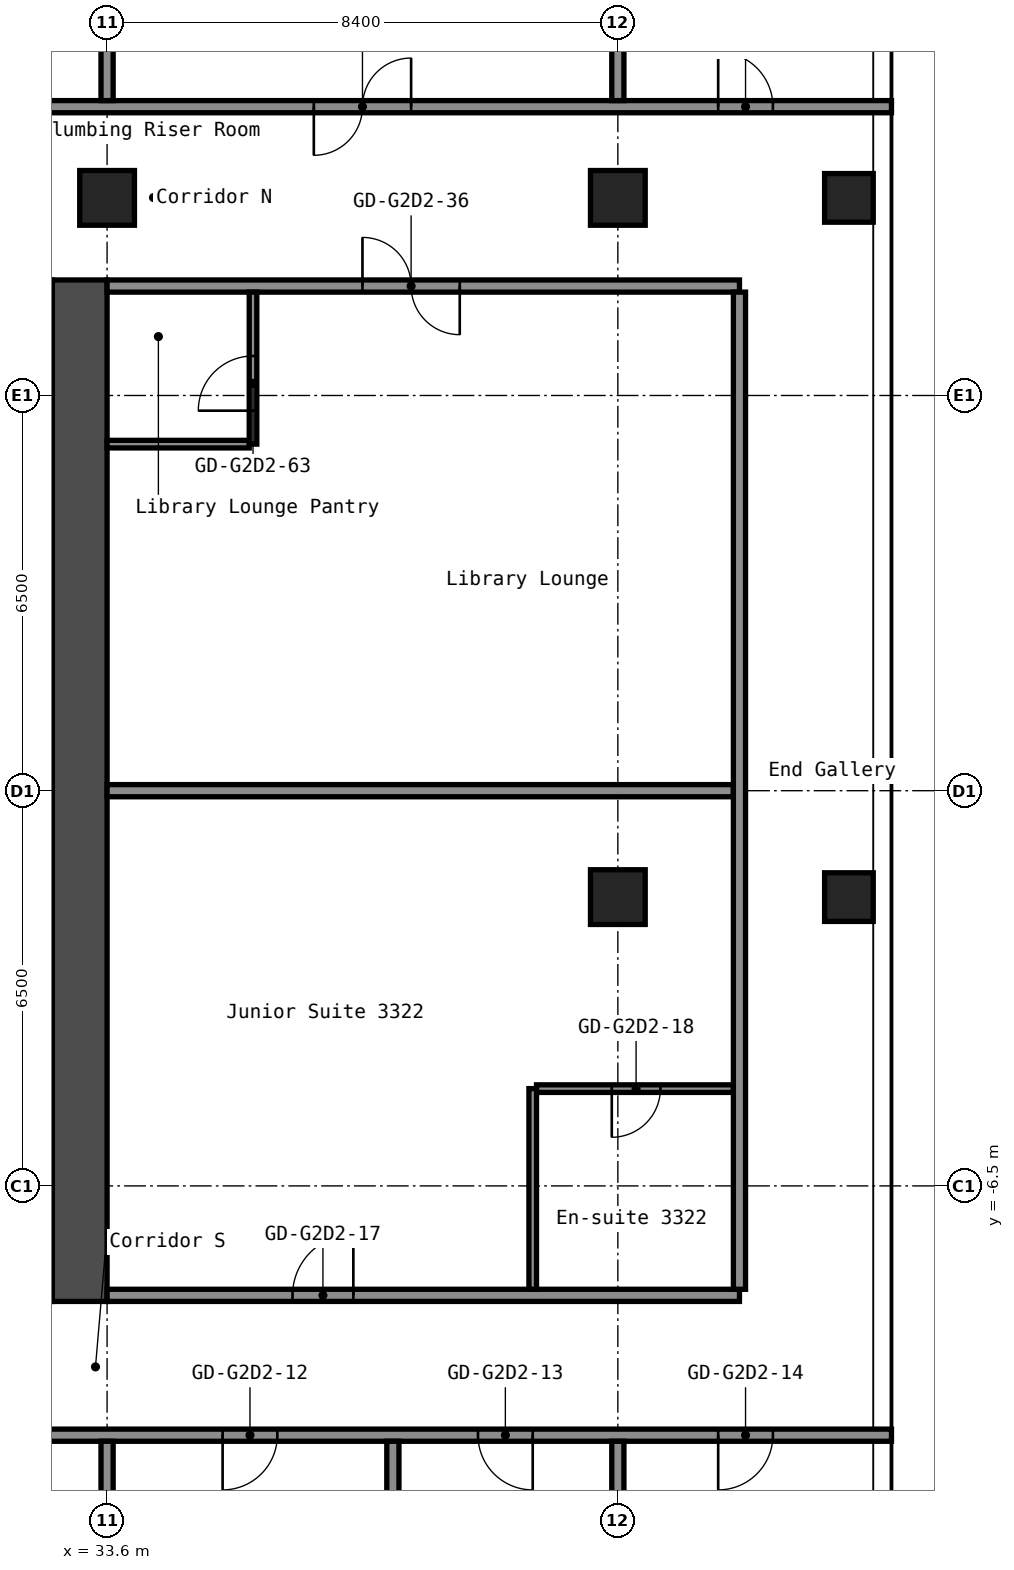
"""IFC4 building model, lengths in metres.
Left out: names, types, materials, properties, quantities, classifications, styles, units other than length and angle.
Written with IfcOpenShell. Run it as: python <this file> out.ifc"""

import sys

from ifc_helpers import new_model, si_unit, direction, frame, frame_2d, origin, origin_2d, place, context, subcontext, project, spatial, rectangle, hollow_rectangle, extrude, element, fill, save


model = new_model("IFC4")
c1 = context("Model", 3, precision=1e-05, world=origin(), true_north=direction((0.0, 1.0)))
c2 = subcontext(c1, "Body", "Model", "MODEL_VIEW")
j1 = project(units=[si_unit("LENGTHUNIT", "METRE"), si_unit("PLANEANGLEUNIT", "RADIAN")], contexts=[c1])
p1 = place(None, origin())
s1 = spatial("IfcSite", under=j1, at=p1, CompositionType="ELEMENT")
p2 = place(p1, origin())
s2 = spatial("IfcBuilding", under=s1, at=p2, CompositionType="ELEMENT")
p3 = place(p2, frame((0.0, 0.0, 117.0)))
s3 = spatial("IfcBuildingStorey", under=s2, at=p3, CompositionType="ELEMENT", Elevation=117.0)
for number, where, z_axis, x_axis in (
    (1, (33.6, 9.75, 0.0), (0.0, 0.0, 1.0), (1.0, 0.0, 0.0)),
    (2, (42.0, -1.75, 0.0), (0.0, 0.0, 1.0), (1.0, 0.0, 0.0)),
    (3, (42.0, 9.75, 0.0), (0.0, 0.0, 1.0), (1.0, 0.0, 0.0)),
):
    element("IfcColumn", number, at=place(p3, frame(where, z_axis=z_axis, x_axis=x_axis)), inside=s3, PredefinedType="COLUMN", context=c2, shape_type="SweptSolid", body=[
        extrude(hollow_rectangle(XDim=0.9, YDim=0.9, WallThickness=0.036, at=origin_2d()), origin(), (0.0, 0.0, 1.0), 2.9),
    ])
for number, where, z_axis, x_axis in (
    (4, (45.8, -1.75, 0.0), (0.0, 0.0, 1.0), (1.0, 0.0, 0.0)),
    (5, (45.8, 9.75, 0.0), (0.0, 0.0, 1.0), (1.0, 0.0, 0.0)),
):
    element("IfcColumn", number, at=place(p3, frame(where, z_axis=z_axis, x_axis=x_axis)), inside=s3, PredefinedType="COLUMN", context=c2, shape_type="SweptSolid", body=[
        extrude(hollow_rectangle(XDim=0.8, YDim=0.8, WallThickness=0.032, at=origin_2d()), origin(), (0.0, 0.0, 1.0), 2.9),
    ])
p4 = place(p3, frame((33.15, -8.4, 0.0), z_axis=(0.0, 0.0, 1.0), x_axis=(0.0, 1.0, 0.0)))
e6 = element("IfcWall", 6, at=p4, inside=s3, PredefinedType="SHEAR", context=c2, shape_type="SweptSolid", body=[
    extrude(rectangle(XDim=16.8, YDim=0.9, at=frame_2d((8.4, 0.0))), origin(), (0.0, 0.0, 1.0), 2.9),
])
p5 = place(p3, frame((16.8, -10.6, 0.0), z_axis=(0.0, 0.0, 1.0), x_axis=(1.0, 0.0, 0.0)))
e7 = element("IfcWall", 7, at=p5, inside=s3, PredefinedType="PARTITIONING", context=c2, shape_type="SweptSolid", body=[
    extrude(rectangle(XDim=29.7, YDim=0.2, at=frame_2d((14.85, 0.0))), origin(), (0.0, 0.0, 1.0), 2.9),
])
p6 = place(p5, frame((1.145, 0.0, 0.0)))
e8 = element("IfcOpeningElement", 8, at=p6, cuts=e7, PredefinedType="OPENING", context=c2, shape_type="SweptSolid", body=[
    extrude(rectangle(XDim=0.9, YDim=2.1, at=frame_2d((0.45, 1.05))), frame((0.0, 0.11, 0.0), z_axis=(0.0, -1.0, 0.0), x_axis=(1.0, 0.0, 0.0)), (0.0, 0.0, 1.0), 0.22),
])
p7 = place(p5, frame((5.345, 0.0, 0.0)))
e9 = element("IfcOpeningElement", 9, at=p7, cuts=e7, PredefinedType="OPENING", context=c2, shape_type="SweptSolid", body=[
    extrude(rectangle(XDim=0.9, YDim=2.1, at=frame_2d((0.45, 1.05))), frame((0.0, 0.11, 0.0), z_axis=(0.0, -1.0, 0.0), x_axis=(1.0, 0.0, 0.0)), (0.0, 0.0, 1.0), 0.22),
])
p8 = place(p5, frame((10.22, 0.0, 0.0)))
e10 = element("IfcOpeningElement", 10, at=p8, cuts=e7, PredefinedType="OPENING", context=c2, shape_type="SweptSolid", body=[
    extrude(rectangle(XDim=0.9, YDim=2.1, at=frame_2d((0.45, 1.05))), frame((0.0, 0.11, 0.0), z_axis=(0.0, -1.0, 0.0), x_axis=(1.0, 0.0, 0.0)), (0.0, 0.0, 1.0), 0.22),
])
p9 = place(p5, frame((14.42, 0.0, 0.0)))
e11 = element("IfcOpeningElement", 11, at=p9, cuts=e7, PredefinedType="OPENING", context=c2, shape_type="SweptSolid", body=[
    extrude(rectangle(XDim=0.9, YDim=2.1, at=frame_2d((0.45, 1.05))), frame((0.0, 0.11, 0.0), z_axis=(0.0, -1.0, 0.0), x_axis=(1.0, 0.0, 0.0)), (0.0, 0.0, 1.0), 0.22),
])
p10 = place(p5, frame((18.7, 0.0, 0.0)))
e12 = element("IfcOpeningElement", 12, at=p10, cuts=e7, PredefinedType="OPENING", context=c2, shape_type="SweptSolid", body=[
    extrude(rectangle(XDim=0.9, YDim=2.1, at=frame_2d((0.45, 1.05))), frame((0.0, 0.11, 0.0), z_axis=(0.0, -1.0, 0.0), x_axis=(1.0, 0.0, 0.0)), (0.0, 0.0, 1.0), 0.22),
])
p11 = place(p5, frame((22.9, 0.0, 0.0)))
e13 = element("IfcOpeningElement", 13, at=p11, cuts=e7, PredefinedType="OPENING", context=c2, shape_type="SweptSolid", body=[
    extrude(rectangle(XDim=0.9, YDim=2.1, at=frame_2d((0.45, 1.05))), frame((0.0, 0.11, 0.0), z_axis=(0.0, -1.0, 0.0), x_axis=(1.0, 0.0, 0.0)), (0.0, 0.0, 1.0), 0.22),
])
p12 = place(p5, frame((26.85, 0.0, 0.0)))
e14 = element("IfcOpeningElement", 14, at=p12, cuts=e7, PredefinedType="OPENING", context=c2, shape_type="SweptSolid", body=[
    extrude(rectangle(XDim=0.9, YDim=2.1, at=frame_2d((0.45, 1.05))), frame((0.0, 0.11, 0.0), z_axis=(0.0, -1.0, 0.0), x_axis=(1.0, 0.0, 0.0)), (0.0, 0.0, 1.0), 0.22),
])
p13 = place(p3, frame((33.6, -8.3, 0.0), z_axis=(0.0, 0.0, 1.0), x_axis=(1.0, 0.0, 0.0)))
e15 = element("IfcWall", 15, at=p13, inside=s3, PredefinedType="PARTITIONING", context=c2, shape_type="SweptSolid", body=[
    extrude(rectangle(XDim=10.4, YDim=0.2, at=frame_2d((5.2, 0.0))), origin(), (0.0, 0.0, 1.0), 2.9),
])
p14 = place(p13, frame((3.05, 0.0, 0.0)))
e16 = element("IfcOpeningElement", 16, at=p14, cuts=e15, PredefinedType="OPENING", context=c2, shape_type="SweptSolid", body=[
    extrude(rectangle(XDim=1.0, YDim=2.1, at=frame_2d((0.5, 1.05))), frame((0.0, 0.11, 0.0), z_axis=(0.0, -1.0, 0.0), x_axis=(1.0, 0.0, 0.0)), (0.0, 0.0, 1.0), 0.22),
])
p15 = place(p3, frame((40.663, -4.9, 0.0), z_axis=(0.0, 0.0, 1.0), x_axis=(1.0, 0.0, 0.0)))
e17 = element("IfcWall", 17, at=p15, inside=s3, PredefinedType="PARTITIONING", context=c2, shape_type="SweptSolid", body=[
    extrude(rectangle(XDim=3.237, YDim=0.125, at=frame_2d((1.619, 0.0))), origin(), (0.0, 0.0, 1.0), 2.9),
])
p16 = place(p15, frame((1.238, 0.0, 0.0)))
e18 = element("IfcOpeningElement", 18, at=p16, cuts=e17, PredefinedType="OPENING", context=c2, shape_type="SweptSolid", body=[
    extrude(rectangle(XDim=0.8, YDim=2.1, at=frame_2d((0.4, 1.05))), frame((0.0, 0.073, 0.0), z_axis=(0.0, -1.0, 0.0), x_axis=(1.0, 0.0, 0.0)), (0.0, 0.0, 1.0), 0.145),
])
p17 = place(p3, frame((33.6, 0.0, 0.0), z_axis=(0.0, 0.0, 1.0), x_axis=(1.0, 0.0, 0.0)))
e19 = element("IfcWall", 19, at=p17, inside=s3, PredefinedType="PARTITIONING", context=c2, shape_type="SweptSolid", body=[
    extrude(rectangle(XDim=10.3, YDim=0.2, at=frame_2d((5.15, 0.0))), origin(), (0.0, 0.0, 1.0), 2.9),
])
p18 = place(p3, frame((33.6, 5.7, 0.0), z_axis=(0.0, 0.0, 1.0), x_axis=(1.0, 0.0, 0.0)))
e20 = element("IfcWall", 20, at=p18, inside=s3, PredefinedType="PARTITIONING", context=c2, shape_type="SweptSolid", body=[
    extrude(rectangle(XDim=2.337, YDim=0.125, at=frame_2d((1.169, 0.0))), origin(), (0.0, 0.0, 1.0), 2.9),
])
p19 = place(p3, frame((33.6, 8.3, 0.0), z_axis=(0.0, 0.0, 1.0), x_axis=(1.0, 0.0, 0.0)))
e21 = element("IfcWall", 21, at=p19, inside=s3, PredefinedType="PARTITIONING", context=c2, shape_type="SweptSolid", body=[
    extrude(rectangle(XDim=10.4, YDim=0.2, at=frame_2d((5.2, 0.0))), origin(), (0.0, 0.0, 1.0), 2.9),
])
p20 = place(p19, frame((4.2, 0.0, 0.0)))
e22 = element("IfcOpeningElement", 22, at=p20, cuts=e21, PredefinedType="OPENING", context=c2, shape_type="SweptSolid", body=[
    extrude(rectangle(XDim=1.6, YDim=2.1, at=frame_2d((0.8, 1.05))), frame((0.0, 0.11, 0.0), z_axis=(0.0, -1.0, 0.0), x_axis=(1.0, 0.0, 0.0)), (0.0, 0.0, 1.0), 0.22),
])
p21 = place(p3, frame((16.8, 11.25, 0.0), z_axis=(0.0, 0.0, 1.0), x_axis=(1.0, 0.0, 0.0)))
e23 = element("IfcWall", 23, at=p21, inside=s3, PredefinedType="PARTITIONING", context=c2, shape_type="SweptSolid", body=[
    extrude(rectangle(XDim=29.7, YDim=0.2, at=frame_2d((14.85, 0.0))), origin(), (0.0, 0.0, 1.0), 2.9),
])
p22 = place(p21, frame((3.4, 0.0, 0.0)))
e24 = element("IfcOpeningElement", 24, at=p22, cuts=e23, PredefinedType="OPENING", context=c2, shape_type="SweptSolid", body=[
    extrude(rectangle(XDim=1.6, YDim=2.1, at=frame_2d((0.8, 1.05))), frame((0.0, 0.11, 0.0), z_axis=(0.0, -1.0, 0.0), x_axis=(1.0, 0.0, 0.0)), (0.0, 0.0, 1.0), 0.22),
])
p23 = place(p21, frame((11.8, 0.0, 0.0)))
e25 = element("IfcOpeningElement", 25, at=p23, cuts=e23, PredefinedType="OPENING", context=c2, shape_type="SweptSolid", body=[
    extrude(rectangle(XDim=1.6, YDim=2.1, at=frame_2d((0.8, 1.05))), frame((0.0, 0.11, 0.0), z_axis=(0.0, -1.0, 0.0), x_axis=(1.0, 0.0, 0.0)), (0.0, 0.0, 1.0), 0.22),
])
p24 = place(p21, frame((20.2, 0.0, 0.0)))
e26 = element("IfcOpeningElement", 26, at=p24, cuts=e23, PredefinedType="OPENING", context=c2, shape_type="SweptSolid", body=[
    extrude(rectangle(XDim=1.6, YDim=2.1, at=frame_2d((0.8, 1.05))), frame((0.0, 0.11, 0.0), z_axis=(0.0, -1.0, 0.0), x_axis=(1.0, 0.0, 0.0)), (0.0, 0.0, 1.0), 0.22),
])
p25 = place(p21, frame((26.85, 0.0, 0.0)))
e27 = element("IfcOpeningElement", 27, at=p25, cuts=e23, PredefinedType="OPENING", context=c2, shape_type="SweptSolid", body=[
    extrude(rectangle(XDim=0.9, YDim=2.1, at=frame_2d((0.45, 1.05))), frame((0.0, 0.11, 0.0), z_axis=(0.0, -1.0, 0.0), x_axis=(1.0, 0.0, 0.0)), (0.0, 0.0, 1.0), 0.22),
])
p26 = place(p3, frame((33.6, -15.55, 0.0), z_axis=(0.0, 0.0, 1.0), x_axis=(0.0, 1.0, 0.0)))
e28 = element("IfcWall", 28, at=p26, inside=s3, PredefinedType="PARTITIONING", context=c2, shape_type="SweptSolid", body=[
    extrude(rectangle(XDim=4.85, YDim=0.2, at=frame_2d((2.425, 0.0))), origin(), (0.0, 0.0, 1.0), 2.9),
])
p27 = place(p3, frame((33.6, 11.35, 0.0), z_axis=(0.0, 0.0, 1.0), x_axis=(0.0, 1.0, 0.0)))
e29 = element("IfcWall", 29, at=p27, inside=s3, PredefinedType="PARTITIONING", context=c2, shape_type="SweptSolid", body=[
    extrude(rectangle(XDim=12.2, YDim=0.2, at=frame_2d((6.1, 0.0))), origin(), (0.0, 0.0, 1.0), 2.9),
])
p28 = place(p3, frame((36.0, 5.7, 0.0), z_axis=(0.0, 0.0, 1.0), x_axis=(0.0, 1.0, 0.0)))
e30 = element("IfcWall", 30, at=p28, inside=s3, PredefinedType="PARTITIONING", context=c2, shape_type="SweptSolid", body=[
    extrude(rectangle(XDim=2.5, YDim=0.125, at=frame_2d((1.25, 0.0))), origin(), (0.0, 0.0, 1.0), 2.9),
])
p29 = place(p28, frame((0.55, 0.0, 0.0)))
e31 = element("IfcOpeningElement", 31, at=p29, cuts=e30, PredefinedType="OPENING", context=c2, shape_type="SweptSolid", body=[
    extrude(rectangle(XDim=0.9, YDim=2.1, at=frame_2d((0.45, 1.05))), frame((0.0, 0.073, 0.0), z_axis=(0.0, -1.0, 0.0), x_axis=(1.0, 0.0, 0.0)), (0.0, 0.0, 1.0), 0.145),
])
p30 = place(p3, frame((38.3, -15.55, 0.0), z_axis=(0.0, 0.0, 1.0), x_axis=(0.0, 1.0, 0.0)))
e32 = element("IfcWall", 32, at=p30, inside=s3, PredefinedType="PARTITIONING", context=c2, shape_type="SweptSolid", body=[
    extrude(rectangle(XDim=4.85, YDim=0.2, at=frame_2d((2.425, 0.0))), origin(), (0.0, 0.0, 1.0), 2.9),
])
p31 = place(p3, frame((40.6, -8.2, 0.0), z_axis=(0.0, 0.0, 1.0), x_axis=(0.0, 1.0, 0.0)))
e33 = element("IfcWall", 33, at=p31, inside=s3, PredefinedType="PARTITIONING", context=c2, shape_type="SweptSolid", body=[
    extrude(rectangle(XDim=3.3, YDim=0.125, at=frame_2d((1.65, 0.0))), origin(), (0.0, 0.0, 1.0), 2.9),
])
p32 = place(p3, frame((42.0, -15.55, 0.0), z_axis=(0.0, 0.0, 1.0), x_axis=(0.0, 1.0, 0.0)))
e34 = element("IfcWall", 34, at=p32, inside=s3, PredefinedType="PARTITIONING", context=c2, shape_type="SweptSolid", body=[
    extrude(rectangle(XDim=4.85, YDim=0.2, at=frame_2d((2.425, 0.0))), origin(), (0.0, 0.0, 1.0), 2.9),
])
p33 = place(p3, frame((42.0, 11.35, 0.0), z_axis=(0.0, 0.0, 1.0), x_axis=(0.0, 1.0, 0.0)))
e35 = element("IfcWall", 35, at=p33, inside=s3, PredefinedType="PARTITIONING", context=c2, shape_type="SweptSolid", body=[
    extrude(rectangle(XDim=12.2, YDim=0.2, at=frame_2d((6.1, 0.0))), origin(), (0.0, 0.0, 1.0), 2.9),
])
p34 = place(p3, frame((44.0, -8.2, 0.0), z_axis=(0.0, 0.0, 1.0), x_axis=(0.0, 1.0, 0.0)))
e36 = element("IfcWall", 36, at=p34, inside=s3, PredefinedType="PARTITIONING", context=c2, shape_type="SweptSolid", body=[
    extrude(rectangle(XDim=16.4, YDim=0.2, at=frame_2d((8.2, 0.0))), origin(), (0.0, 0.0, 1.0), 2.9),
])
p35 = place(p10, origin())
e37 = element("IfcDoor", 37, at=p35, inside=s3, OperationType="SINGLE_SWING_LEFT", PredefinedType="DOOR", context=c2, shape_type="SweptSolid", body=[
    extrude(rectangle(XDim=0.9, YDim=2.1, at=frame_2d((0.45, 1.05))), frame((0.0, 0.025, 0.0), z_axis=(0.0, -1.0, 0.0), x_axis=(1.0, 0.0, 0.0)), (0.0, 0.0, 1.0), 0.05),
])
fill(e12, e37)
p36 = place(p11, origin())
e38 = element("IfcDoor", 38, at=p36, inside=s3, OperationType="SINGLE_SWING_RIGHT", PredefinedType="DOOR", context=c2, shape_type="SweptSolid", body=[
    extrude(rectangle(XDim=0.9, YDim=2.1, at=frame_2d((0.45, 1.05))), frame((0.0, 0.025, 0.0), z_axis=(0.0, -1.0, 0.0), x_axis=(1.0, 0.0, 0.0)), (0.0, 0.0, 1.0), 0.05),
])
fill(e13, e38)
p37 = place(p12, origin())
e39 = element("IfcDoor", 39, at=p37, inside=s3, OperationType="SINGLE_SWING_LEFT", PredefinedType="DOOR", context=c2, shape_type="SweptSolid", body=[
    extrude(rectangle(XDim=0.9, YDim=2.1, at=frame_2d((0.45, 1.05))), frame((0.0, 0.025, 0.0), z_axis=(0.0, -1.0, 0.0), x_axis=(1.0, 0.0, 0.0)), (0.0, 0.0, 1.0), 0.05),
])
fill(e14, e39)
p38 = place(p14, origin())
e40 = element("IfcDoor", 40, at=p38, inside=s3, OperationType="SINGLE_SWING_LEFT", PredefinedType="DOOR", context=c2, shape_type="SweptSolid", body=[
    extrude(rectangle(XDim=1.0, YDim=2.1, at=frame_2d((0.5, 1.05))), frame((0.0, 0.025, 0.0), z_axis=(0.0, -1.0, 0.0), x_axis=(1.0, 0.0, 0.0)), (0.0, 0.0, 1.0), 0.05),
])
fill(e16, e40)
p39 = place(p16, origin())
e41 = element("IfcDoor", 41, at=p39, inside=s3, OperationType="SINGLE_SWING_LEFT", PredefinedType="DOOR", context=c2, shape_type="SweptSolid", body=[
    extrude(rectangle(XDim=0.8, YDim=2.1, at=frame_2d((0.4, 1.05))), frame((0.0, 0.025, 0.0), z_axis=(0.0, -1.0, 0.0), x_axis=(1.0, 0.0, 0.0)), (0.0, 0.0, 1.0), 0.05),
])
fill(e18, e41)
p40 = place(p20, origin())
e42 = element("IfcDoor", 42, at=p40, inside=s3, OperationType="DOUBLE_DOOR_SINGLE_SWING", PredefinedType="DOOR", context=c2, shape_type="SweptSolid", body=[
    extrude(rectangle(XDim=1.6, YDim=2.1, at=frame_2d((0.8, 1.05))), frame((0.0, 0.025, 0.0), z_axis=(0.0, -1.0, 0.0), x_axis=(1.0, 0.0, 0.0)), (0.0, 0.0, 1.0), 0.05),
])
fill(e22, e42)
p41 = place(p24, origin())
e43 = element("IfcDoor", 43, at=p41, inside=s3, OperationType="DOUBLE_DOOR_SINGLE_SWING", PredefinedType="DOOR", context=c2, shape_type="SweptSolid", body=[
    extrude(rectangle(XDim=1.6, YDim=2.1, at=frame_2d((0.8, 1.05))), frame((0.0, 0.025, 0.0), z_axis=(0.0, -1.0, 0.0), x_axis=(1.0, 0.0, 0.0)), (0.0, 0.0, 1.0), 0.05),
])
fill(e26, e43)
p42 = place(p25, origin())
e44 = element("IfcDoor", 44, at=p42, inside=s3, OperationType="SINGLE_SWING_RIGHT", PredefinedType="DOOR", context=c2, shape_type="SweptSolid", body=[
    extrude(rectangle(XDim=0.9, YDim=2.1, at=frame_2d((0.45, 1.05))), frame((0.0, 0.025, 0.0), z_axis=(0.0, -1.0, 0.0), x_axis=(1.0, 0.0, 0.0)), (0.0, 0.0, 1.0), 0.05),
])
fill(e27, e44)
p43 = place(p29, origin())
e45 = element("IfcDoor", 45, at=p43, inside=s3, OperationType="SINGLE_SWING_RIGHT", PredefinedType="DOOR", context=c2, shape_type="SweptSolid", body=[
    extrude(rectangle(XDim=0.9, YDim=2.1, at=frame_2d((0.45, 1.05))), frame((0.0, 0.025, 0.0), z_axis=(0.0, -1.0, 0.0), x_axis=(1.0, 0.0, 0.0)), (0.0, 0.0, 1.0), 0.05),
])
fill(e31, e45)
save(model, sys.argv[1])
